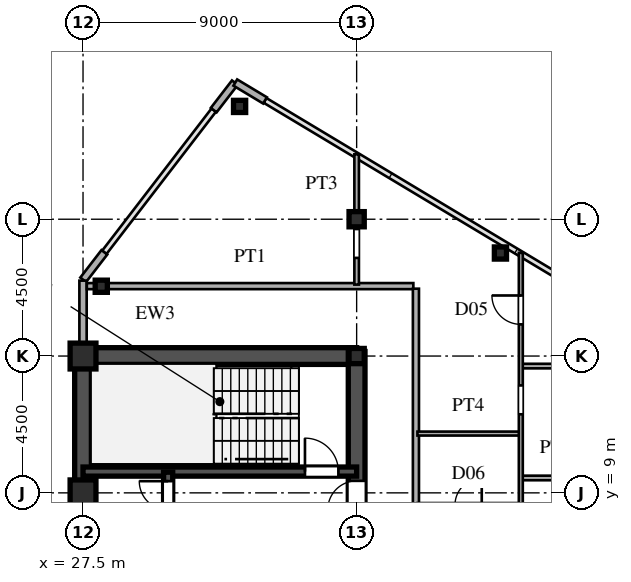
"""IFC4 building model, lengths in metres.
Left out: names, types, materials, properties, quantities, classifications, styles, units other than length and angle.
Written with IfcOpenShell. Run it as: python <this file> out.ifc"""

import sys

from ifc_helpers import new_model, si_unit, direction, frame, frame_2d, origin, origin_2d, place, context, subcontext, project, spatial, rectangle, hollow_rectangle, i_section, extrude, source, transform, mapped, element, fill, save


model = new_model("IFC4")
c1 = context("Model", 3, precision=1e-05, world=origin(), true_north=direction((0.0, 1.0)))
c2 = subcontext(c1, "Body", "Model", "MODEL_VIEW")
j1 = project(units=[si_unit("LENGTHUNIT", "METRE"), si_unit("PLANEANGLEUNIT", "RADIAN")], contexts=[c1])
p1 = place(None, origin())
s1 = spatial("IfcSite", under=j1, at=p1, CompositionType="ELEMENT")
p2 = place(p1, origin())
s2 = spatial("IfcBuilding", under=s1, at=p2, CompositionType="ELEMENT")
p3 = place(p2, frame((0.0, 0.0, 195.9)))
s3 = spatial("IfcBuildingStorey", under=s2, at=p3, CompositionType="ELEMENT", Elevation=195.9)
m1 = source(origin(), c2, "Body", "SweptSolid", [
    extrude(hollow_rectangle(XDim=0.85, YDim=0.85, WallThickness=0.036, at=origin_2d()), origin(), (0.0, 0.0, 1.0), 3.6),
])
for number, where, z_axis, x_axis in (
    (1, (27.5, 9.0, 0.0), (0.0, 0.0, 1.0), (1.0, 0.0, 0.0)),
    (2, (27.5, 13.5, 0.0), (0.0, 0.0, 1.0), (1.0, 0.0, 0.0)),
):
    element("IfcColumn", number, at=place(p3, frame(where, z_axis=z_axis, x_axis=x_axis)), inside=s3, PredefinedType="COLUMN", context=c2, shape_type="MappedRepresentation", body=[
        mapped(m1, transform((0.0, 0.0, 0.0), scale=1.0)),
    ])
m2 = source(origin(), c2, "Body", "SweptSolid", [
    extrude(i_section(OverallWidth=0.5, OverallDepth=0.5, WebThickness=0.02, FlangeThickness=0.032, at=origin_2d()), origin(), (0.0, 0.0, 1.0), 3.6),
])
for number, where, z_axis, x_axis in (
    (3, (36.5, 13.5, 0.0), (0.0, 0.0, 1.0), (1.0, 0.0, 0.0)),
    (4, (36.5, 18.0, 0.0), (0.0, 0.0, 1.0), (1.0, 0.0, 0.0)),
):
    element("IfcColumn", number, at=place(p3, frame(where, z_axis=z_axis, x_axis=x_axis)), inside=s3, PredefinedType="COLUMN", context=c2, shape_type="MappedRepresentation", body=[
        mapped(m2, transform((0.0, 0.0, 0.0), scale=1.0)),
    ])
m3 = source(origin(), c2, "Body", "SweptSolid", [
    extrude(hollow_rectangle(XDim=0.4, YDim=0.4, WallThickness=0.016, at=origin_2d()), origin(), (0.0, 0.0, 1.0), 3.6),
])
for number, where, z_axis, x_axis in (
    (5, (32.65, 21.71, 0.0), (0.0, 0.0, 1.0), (1.0, 0.0, 0.0)),
    (6, (28.1, 15.796, 0.0), (0.0, 0.0, 1.0), (1.0, 0.0, 0.0)),
    (7, (41.23, 16.889, 0.0), (0.0, 0.0, 1.0), (1.0, 0.0, 0.0)),
):
    element("IfcColumn", number, at=place(p3, frame(where, z_axis=z_axis, x_axis=x_axis)), inside=s3, PredefinedType="COLUMN", context=c2, shape_type="MappedRepresentation", body=[
        mapped(m3, transform((0.0, 0.0, 0.0), scale=1.0)),
    ])
for number, where, z_axis, x_axis in (
    (8, (33.486, 21.908, 0.0), (0.0, 0.0, 1.0), (-0.857, 0.515, 0.0)),
    (9, (32.494, 22.492, 0.0), (0.0, 0.0, 1.0), (-0.61, -0.793, 0.0)),
    (10, (28.201, 16.912, 0.0), (0.0, 0.0, 1.0), (-0.61, -0.793, 0.0)),
):
    element("IfcWall", number, at=place(p3, frame(where, z_axis=z_axis, x_axis=x_axis)), inside=s3, PredefinedType="SOLIDWALL", context=c2, shape_type="SweptSolid", body=[
        extrude(rectangle(XDim=1.14, YDim=0.24, at=frame_2d((0.57, 0.0))), origin(), (0.0, 0.0, 1.0), 3.38),
    ])
p4 = place(p3, frame((27.5, 13.78, 0.0), z_axis=(0.0, 0.0, 1.0), x_axis=(0.0, 1.0, 0.0)))
e11 = element("IfcWall", 11, at=p4, inside=s3, PredefinedType="SOLIDWALL", context=c2, shape_type="SweptSolid", body=[
    extrude(rectangle(XDim=0.6, YDim=0.24, at=frame_2d((0.3, 0.0))), origin(), (0.0, 0.0, 1.0), 2.88),
])
p5 = place(p3, frame((27.5, 14.38, 0.0), z_axis=(0.0, 0.0, 1.0), x_axis=(0.0, 1.0, 0.0)))
e12 = element("IfcWall", 12, at=p5, inside=s3, PredefinedType="SOLIDWALL", context=c2, shape_type="SweptSolid", body=[
    extrude(rectangle(XDim=1.6, YDim=0.24, at=frame_2d((0.8, 0.0))), origin(), (0.0, 0.0, 1.0), 3.38),
])
p6 = place(p3, frame((27.5, 1.3, 0.0), z_axis=(0.0, 0.0, 1.0), x_axis=(0.0, 1.0, 0.0)))
e13 = element("IfcWall", 13, at=p6, inside=s3, PredefinedType="SHEAR", context=c2, shape_type="SweptSolid", body=[
    extrude(rectangle(XDim=12.2, YDim=0.55, at=frame_2d((6.1, 0.0))), origin(), (0.0, 0.0, 1.0), 3.38),
])
p7 = place(p3, frame((27.5, 13.5, 0.0), z_axis=(0.0, 0.0, 1.0), x_axis=(1.0, 0.0, 0.0)))
e14 = element("IfcWall", 14, at=p7, inside=s3, PredefinedType="SHEAR", context=c2, shape_type="SweptSolid", body=[
    extrude(rectangle(XDim=9.0, YDim=0.55, at=frame_2d((4.5, 0.0))), origin(), (0.0, 0.0, 1.0), 3.38),
])
p8 = place(p3, frame((36.5, 8.2, 0.0), z_axis=(0.0, 0.0, 1.0), x_axis=(0.0, 1.0, 0.0)))
e15 = element("IfcWall", 15, at=p8, inside=s3, PredefinedType="SHEAR", context=c2, shape_type="SweptSolid", body=[
    extrude(rectangle(XDim=5.45, YDim=0.55, at=frame_2d((2.725, 0.0))), origin(), (0.0, 0.0, 1.0), 3.38),
])
p9 = place(p8, frame((0.245, 0.0, 0.0)))
e16 = element("IfcOpeningElement", 16, at=p9, cuts=e15, PredefinedType="OPENING", context=c2, shape_type="SweptSolid", body=[
    extrude(rectangle(XDim=0.95, YDim=2.15, at=frame_2d((0.475, 1.075))), frame((0.0, 0.285, 0.0), z_axis=(0.0, -1.0, 0.0), x_axis=(1.0, 0.0, 0.0)), (0.0, 0.0, 1.0), 0.57),
])
p10 = place(p3, frame((27.5, 9.7, 0.0), z_axis=(0.0, 0.0, 1.0), x_axis=(1.0, 0.0, 0.0)))
e17 = element("IfcWall", 17, at=p10, inside=s3, PredefinedType="SHEAR", context=c2, shape_type="SweptSolid", body=[
    extrude(rectangle(XDim=9.0, YDim=0.3, at=frame_2d((4.5, 0.0))), origin(), (0.0, 0.0, 1.0), 3.38),
])
p11 = place(p10, frame((7.3, 0.0, 0.0)))
e18 = element("IfcOpeningElement", 18, at=p11, cuts=e17, PredefinedType="OPENING", context=c2, shape_type="SweptSolid", body=[
    extrude(rectangle(XDim=1.1, YDim=2.2, at=frame_2d((0.55, 1.1))), frame((0.0, 0.16, 0.0), z_axis=(0.0, -1.0, 0.0), x_axis=(1.0, 0.0, 0.0)), (0.0, 0.0, 1.0), 0.32),
])
p12 = place(p3, frame((30.3, 8.15, 0.0), z_axis=(0.0, 0.0, 1.0), x_axis=(0.0, 1.0, 0.0)))
e19 = element("IfcWall", 19, at=p12, inside=s3, PredefinedType="SHEAR", context=c2, shape_type="SweptSolid", body=[
    extrude(rectangle(XDim=1.53, YDim=0.3, at=frame_2d((0.765, 0.0))), origin(), (0.0, 0.0, 1.0), 3.38),
])
p13 = place(p12, frame((0.285, 0.0, 0.0)))
e20 = element("IfcOpeningElement", 20, at=p13, cuts=e19, PredefinedType="OPENING", context=c2, shape_type="SweptSolid", body=[
    extrude(rectangle(XDim=0.95, YDim=2.15, at=frame_2d((0.475, 1.075))), frame((0.0, 0.16, 0.0), z_axis=(0.0, -1.0, 0.0), x_axis=(1.0, 0.0, 0.0)), (0.0, 0.0, 1.0), 0.32),
])
p14 = place(p3, frame((41.95, 9.49, 0.0), z_axis=(0.0, 0.0, 1.0), x_axis=(1.0, 0.0, 0.0)))
e21 = element("IfcWall", 21, at=p14, inside=s3, PredefinedType="PARTITIONING", context=c2, shape_type="SweptSolid", body=[
    extrude(rectangle(XDim=12.274, YDim=0.15, at=frame_2d((6.137, 0.0))), origin(), (0.0, 0.0, 1.0), 3.38),
])
p15 = place(p14, frame((5.619, 0.0, 0.0)))
e22 = element("IfcOpeningElement", 22, at=p15, cuts=e21, PredefinedType="OPENING", context=c2, shape_type="SweptSolid", body=[
    extrude(rectangle(XDim=0.95, YDim=2.15, at=frame_2d((0.475, 1.075))), frame((0.0, 0.085, 0.0), z_axis=(0.0, -1.0, 0.0), x_axis=(1.0, 0.0, 0.0)), (0.0, 0.0, 1.0), 0.17),
])
p16 = place(p3, frame((38.5, 10.95, 0.0), z_axis=(0.0, 0.0, 1.0), x_axis=(1.0, 0.0, 0.0)))
e23 = element("IfcWall", 23, at=p16, inside=s3, PredefinedType="PARTITIONING", context=c2, shape_type="SweptSolid", body=[
    extrude(rectangle(XDim=3.35, YDim=0.13, at=frame_2d((1.675, 0.0))), origin(), (0.0, 0.0, 1.0), 3.38),
])
p17 = place(p3, frame((41.95, 13.17, 0.0), z_axis=(0.0, 0.0, 1.0), x_axis=(1.0, 0.0, 0.0)))
e24 = element("IfcWall", 24, at=p17, inside=s3, PredefinedType="PARTITIONING", context=c2, shape_type="SweptSolid", body=[
    extrude(rectangle(XDim=6.13, YDim=0.15, at=frame_2d((3.065, 0.0))), origin(), (0.0, 0.0, 1.0), 3.38),
])
p18 = place(p3, frame((27.625, 15.8, 0.0), z_axis=(0.0, 0.0, 1.0), x_axis=(1.0, 0.0, 0.0)))
e25 = element("IfcWall", 25, at=p18, inside=s3, PredefinedType="PARTITIONING", context=c2, shape_type="SweptSolid", body=[
    extrude(rectangle(XDim=10.74, YDim=0.2, at=frame_2d((5.37, 0.0))), origin(), (0.0, 0.0, 1.0), 3.38),
])
p19 = place(p3, frame((36.5, 15.85, 0.0), z_axis=(0.0, 0.0, 1.0), x_axis=(0.0, 1.0, 0.0)))
e26 = element("IfcWall", 26, at=p19, inside=s3, PredefinedType="PARTITIONING", context=c2, shape_type="SweptSolid", body=[
    extrude(rectangle(XDim=4.285, YDim=0.15, at=frame_2d((2.143, 0.0))), origin(), (0.0, 0.0, 1.0), 2.78),
])
p20 = place(p19, frame((0.878, 0.0, 0.0)))
e27 = element("IfcOpeningElement", 27, at=p20, cuts=e26, PredefinedType="OPENING", context=c2, shape_type="SweptSolid", body=[
    extrude(rectangle(XDim=0.95, YDim=2.15, at=frame_2d((0.475, 1.075))), frame((0.0, 0.085, 0.0), z_axis=(0.0, -1.0, 0.0), x_axis=(1.0, 0.0, 0.0)), (0.0, 0.0, 1.0), 0.17),
])
p21 = place(p3, frame((38.45, -15.715, 0.0), z_axis=(0.0, 0.0, 1.0), x_axis=(0.0, 1.0, 0.0)))
e28 = element("IfcWall", 28, at=p21, inside=s3, PredefinedType="PARTITIONING", context=c2, shape_type="SweptSolid", body=[
    extrude(rectangle(XDim=31.43, YDim=0.2, at=frame_2d((15.715, 0.0))), origin(), (0.0, 0.0, 1.0), 3.38),
])
p22 = place(p21, frame((3.39, 0.0, 0.0)))
e29 = element("IfcOpeningElement", 29, at=p22, cuts=e28, PredefinedType="OPENING", context=c2, shape_type="SweptSolid", body=[
    extrude(rectangle(XDim=1.05, YDim=2.25, at=frame_2d((0.525, 1.125))), frame((0.0, 0.11, 0.0), z_axis=(0.0, -1.0, 0.0), x_axis=(1.0, 0.0, 0.0)), (0.0, 0.0, 1.0), 0.22),
])
p23 = place(p21, frame((13.986, 0.0, 0.0)))
e30 = element("IfcOpeningElement", 30, at=p23, cuts=e28, PredefinedType="OPENING", context=c2, shape_type="SweptSolid", body=[
    extrude(rectangle(XDim=1.05, YDim=2.25, at=frame_2d((0.525, 1.125))), frame((0.0, 0.11, 0.0), z_axis=(0.0, -1.0, 0.0), x_axis=(1.0, 0.0, 0.0)), (0.0, 0.0, 1.0), 0.22),
])
p24 = place(p21, frame((22.387, 0.0, 0.0)))
e31 = element("IfcOpeningElement", 31, at=p24, cuts=e28, PredefinedType="OPENING", context=c2, shape_type="SweptSolid", body=[
    extrude(rectangle(XDim=1.05, YDim=2.25, at=frame_2d((0.525, 1.125))), frame((0.0, 0.11, 0.0), z_axis=(0.0, -1.0, 0.0), x_axis=(1.0, 0.0, 0.0)), (0.0, 0.0, 1.0), 0.22),
])
p25 = place(p3, frame((41.9, 1.772, 0.0), z_axis=(0.0, 0.0, 1.0), x_axis=(0.0, 1.0, 0.0)))
e32 = element("IfcWall", 32, at=p25, inside=s3, PredefinedType="PARTITIONING", context=c2, shape_type="SweptSolid", body=[
    extrude(rectangle(XDim=15.123, YDim=0.13, at=frame_2d((7.562, 0.0))), origin(), (0.0, 0.0, 1.0), 3.38),
])
p26 = place(p25, frame((4.95, 0.0, 0.0)))
e33 = element("IfcOpeningElement", 33, at=p26, cuts=e32, PredefinedType="OPENING", context=c2, shape_type="SweptSolid", body=[
    extrude(rectangle(XDim=0.95, YDim=2.15, at=frame_2d((0.475, 1.075))), frame((0.0, 0.075, 0.0), z_axis=(0.0, -1.0, 0.0), x_axis=(1.0, 0.0, 0.0)), (0.0, 0.0, 1.0), 0.15),
])
p27 = place(p25, frame((9.812, 0.0, 0.0)))
e34 = element("IfcOpeningElement", 34, at=p27, cuts=e32, PredefinedType="OPENING", context=c2, shape_type="SweptSolid", body=[
    extrude(rectangle(XDim=0.95, YDim=2.15, at=frame_2d((0.475, 1.075))), frame((0.0, 0.075, 0.0), z_axis=(0.0, -1.0, 0.0), x_axis=(1.0, 0.0, 0.0)), (0.0, 0.0, 1.0), 0.15),
])
p28 = place(p25, frame((12.77, 0.0, 0.0)))
e35 = element("IfcOpeningElement", 35, at=p28, cuts=e32, PredefinedType="OPENING", context=c2, shape_type="SweptSolid", body=[
    extrude(rectangle(XDim=0.95, YDim=2.15, at=frame_2d((0.475, 1.075))), frame((0.0, 0.075, 0.0), z_axis=(0.0, -1.0, 0.0), x_axis=(1.0, 0.0, 0.0)), (0.0, 0.0, 1.0), 0.15),
])
m4 = source(origin(), c2, "Body", "SweptSolid", [
    extrude(rectangle(XDim=0.95, YDim=2.15, at=frame_2d((0.475, 1.075))), frame((0.0, 0.025, 0.0), z_axis=(0.0, -1.0, 0.0), x_axis=(1.0, 0.0, 0.0)), (0.0, 0.0, 1.0), 0.05),
])
p29 = place(p9, origin())
e36 = element("IfcDoor", 36, at=p29, inside=s3, OperationType="SINGLE_SWING_LEFT", PredefinedType="DOOR", context=c2, shape_type="MappedRepresentation", body=[
    mapped(m4, transform((0.0, 0.0, 0.0), scale=1.0)),
])
fill(e16, e36)
m5 = source(origin(), c2, "Body", "SweptSolid", [
    extrude(rectangle(XDim=1.1, YDim=2.2, at=frame_2d((0.55, 1.1))), frame((0.0, 0.025, 0.0), z_axis=(0.0, -1.0, 0.0), x_axis=(1.0, 0.0, 0.0)), (0.0, 0.0, 1.0), 0.05),
])
p30 = place(p11, origin())
e37 = element("IfcDoor", 37, at=p30, inside=s3, OperationType="SINGLE_SWING_LEFT", PredefinedType="DOOR", context=c2, shape_type="MappedRepresentation", body=[
    mapped(m5, transform((0.0, 0.0, 0.0), scale=1.0)),
])
fill(e18, e37)
p31 = place(p13, origin())
e38 = element("IfcDoor", 38, at=p31, inside=s3, OperationType="SINGLE_SWING_RIGHT", PredefinedType="DOOR", context=c2, shape_type="MappedRepresentation", body=[
    mapped(m4, transform((0.0, 0.0, 0.0), scale=1.0)),
])
fill(e20, e38)
m6 = source(origin(), c2, "Body", "SweptSolid", [
    extrude(rectangle(XDim=0.95, YDim=2.15, at=frame_2d((0.475, 1.075))), frame((0.0, 0.025, 0.0), z_axis=(0.0, -1.0, 0.0), x_axis=(1.0, 0.0, 0.0)), (0.0, 0.0, 1.0), 0.05),
])
p32 = place(p28, origin())
e39 = element("IfcDoor", 39, at=p32, inside=s3, OperationType="SINGLE_SWING_RIGHT", PredefinedType="DOOR", context=c2, shape_type="MappedRepresentation", body=[
    mapped(m6, transform((0.0, 0.0, 0.0), scale=1.0)),
])
fill(e35, e39)
save(model, sys.argv[1])
